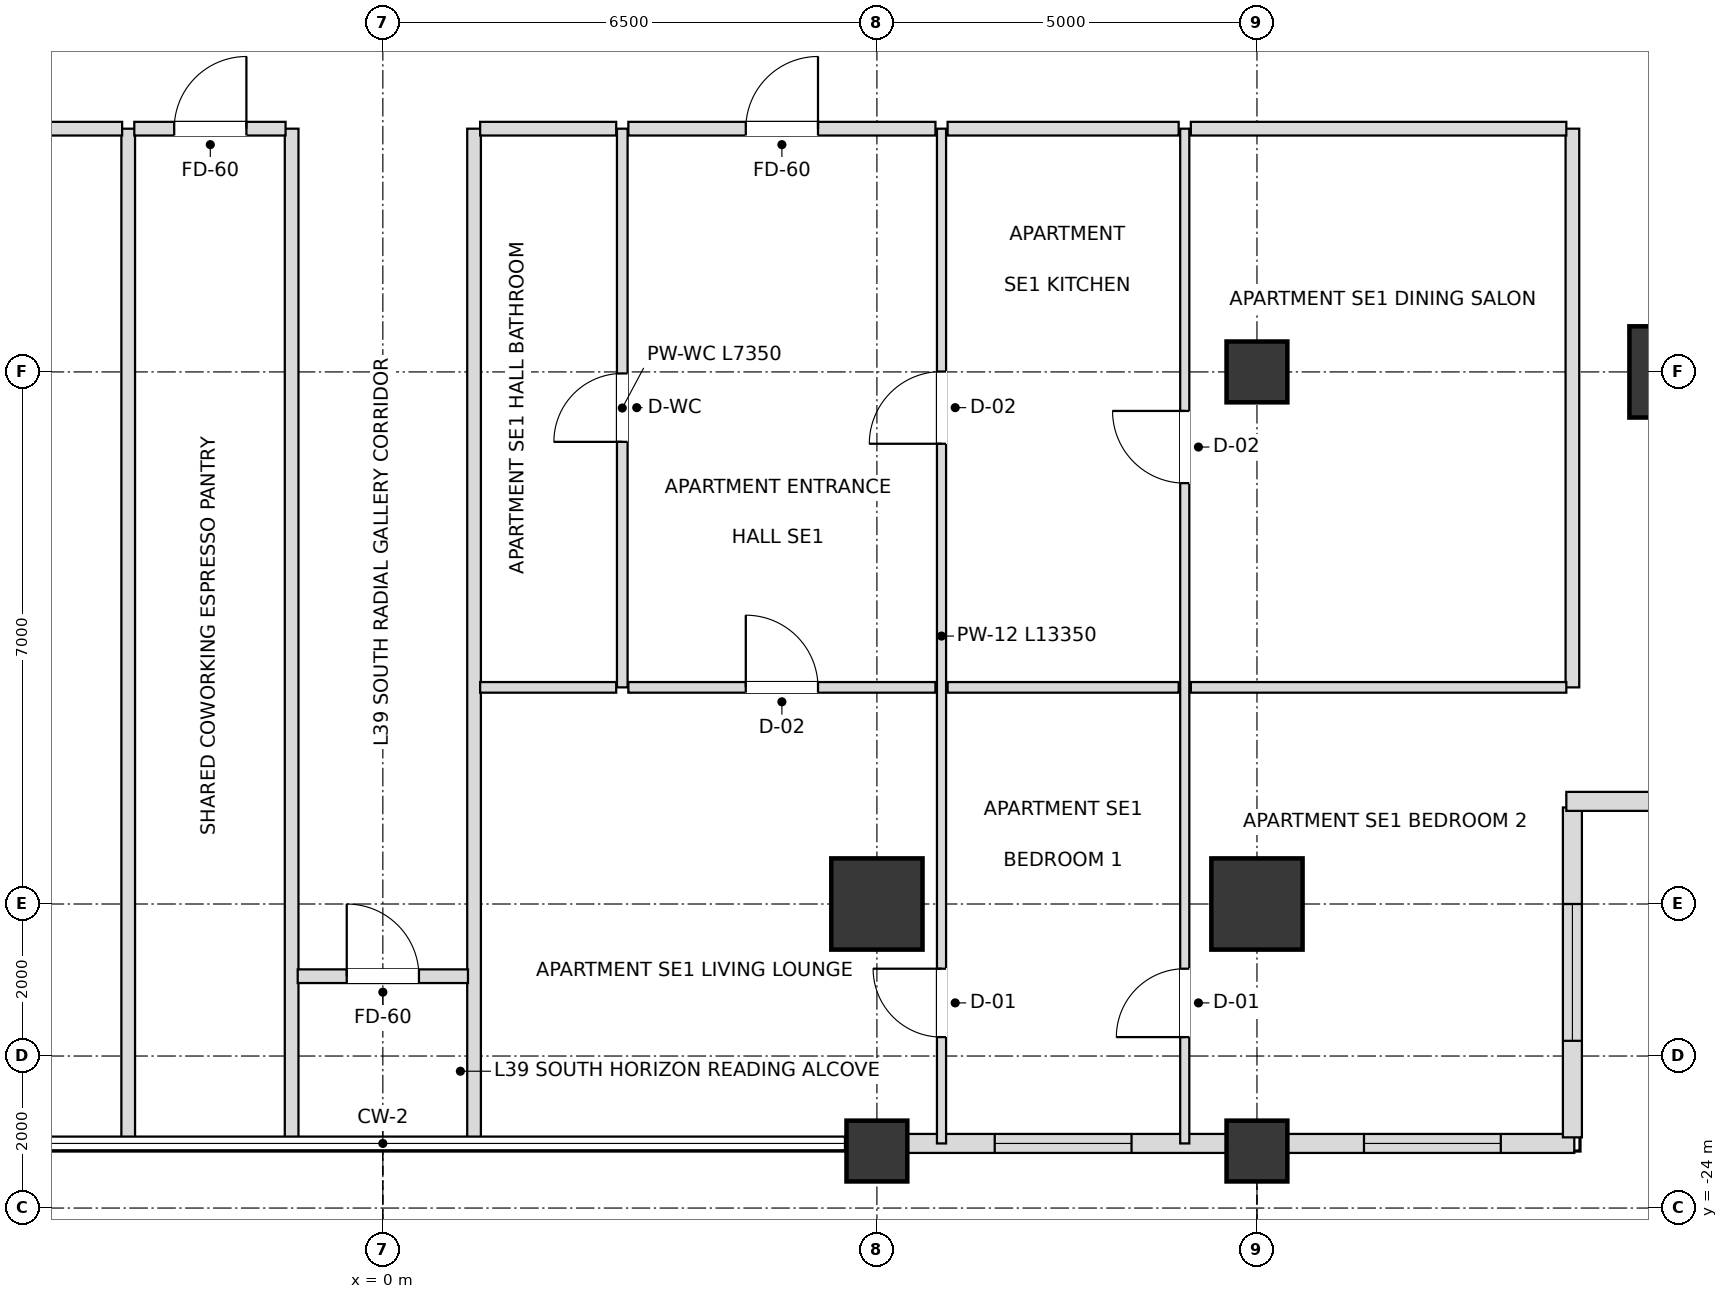
"""IFC4 building model, lengths in metres.
Left out: names, types, materials, properties, quantities, classifications, styles, units other than length and angle.
Written with IfcOpenShell. Run it as: python <this file> out.ifc"""

import sys

from ifc_helpers import new_model, si_unit, direction, frame, frame_2d, origin, origin_2d, place, context, subcontext, project, spatial, rectangle, extrude, element, fill, save


model = new_model("IFC4")
c1 = context("Model", 3, precision=1e-05, world=origin(), true_north=direction((0.0, 1.0)))
c2 = subcontext(c1, "Body", "Model", "MODEL_VIEW")
j1 = project(units=[si_unit("LENGTHUNIT", "METRE"), si_unit("PLANEANGLEUNIT", "RADIAN")], contexts=[c1])
p1 = place(None, origin())
s1 = spatial("IfcSite", under=j1, at=p1, CompositionType="ELEMENT")
p2 = place(p1, origin())
s2 = spatial("IfcBuilding", under=s1, at=p2, CompositionType="ELEMENT")
p3 = place(p2, frame((0.0, 0.0, 154.8)))
s3 = spatial("IfcBuildingStorey", under=s2, at=p3, CompositionType="ELEMENT", Elevation=154.8)
for number, where, z_axis, x_axis in (
    (1, (6.5, -20.0, 0.0), (0.0, 0.0, 1.0), (1.0, 0.0, 0.0)),
    (2, (11.5, -20.0, 0.0), (0.0, 0.0, 1.0), (1.0, 0.0, 0.0)),
    (3, (17.0, -13.0, 0.0), (0.0, 0.0, 1.0), (1.0, 0.0, 0.0)),
):
    element("IfcColumn", number, at=place(p3, frame(where, z_axis=z_axis, x_axis=x_axis)), inside=s3, PredefinedType="USERDEFINED", context=c2, shape_type="SweptSolid", body=[
        extrude(rectangle(XDim=1.2, YDim=1.2, at=origin_2d()), origin(), (0.0, 0.0, 1.0), 3.6),
    ])
for number, where, z_axis, x_axis in (
    (4, (11.5, -13.0, 0.0), (0.0, 0.0, 1.0), (1.0, 0.0, 0.0)),
    (5, (6.5, -23.25, 0.0), (0.0, 0.0, 1.0), (1.0, 0.0, 0.0)),
    (6, (11.5, -23.25, 0.0), (0.0, 0.0, 1.0), (1.0, 0.0, 0.0)),
):
    element("IfcColumn", number, at=place(p3, frame(where, z_axis=z_axis, x_axis=x_axis)), inside=s3, PredefinedType="COLUMN", context=c2, shape_type="SweptSolid", body=[
        extrude(rectangle(XDim=0.8, YDim=0.8, at=origin_2d()), origin(), (0.0, 0.0, 1.0), 3.6),
    ])
p4 = place(p3, frame((6.895, -23.15, 0.0), z_axis=(0.0, 0.0, 1.0), x_axis=(1.0, 0.0, 0.0)))
e7 = element("IfcWall", 7, at=p4, inside=s3, PredefinedType="SOLIDWALL", context=c2, shape_type="SweptSolid", body=[
    extrude(rectangle(XDim=4.21, YDim=0.25, at=frame_2d((2.105, 0.0))), origin(), (0.0, 0.0, 1.0), 2.736),
])
p5 = place(p4, frame((1.155, 0.0, 0.72)))
e8 = element("IfcOpeningElement", 8, at=p5, cuts=e7, PredefinedType="OPENING", context=c2, shape_type="SweptSolid", body=[
    extrude(rectangle(XDim=1.8, YDim=1.68, at=frame_2d((0.9, 0.84))), frame((0.0, 0.135, 0.0), z_axis=(0.0, -1.0, 0.0), x_axis=(1.0, 0.0, 0.0)), (0.0, 0.0, 1.0), 0.27),
])
p6 = place(p3, frame((11.895, -23.15, 0.0), z_axis=(0.0, 0.0, 1.0), x_axis=(1.0, 0.0, 0.0)))
e9 = element("IfcWall", 9, at=p6, inside=s3, PredefinedType="SOLIDWALL", context=c2, shape_type="SweptSolid", body=[
    extrude(rectangle(XDim=3.78, YDim=0.25, at=frame_2d((1.89, 0.0))), origin(), (0.0, 0.0, 1.0), 2.736),
])
p7 = place(p6, frame((1.013, 0.0, 0.72)))
e10 = element("IfcOpeningElement", 10, at=p7, cuts=e9, PredefinedType="OPENING", context=c2, shape_type="SweptSolid", body=[
    extrude(rectangle(XDim=1.8, YDim=1.68, at=frame_2d((0.9, 0.84))), frame((0.0, 0.135, 0.0), z_axis=(0.0, -1.0, 0.0), x_axis=(1.0, 0.0, 0.0)), (0.0, 0.0, 1.0), 0.27),
])
p8 = place(p3, frame((15.65, -23.07, 0.0), z_axis=(0.0, 0.0, 1.0), x_axis=(0.0, 1.0, 0.0)))
e11 = element("IfcWall", 11, at=p8, inside=s3, PredefinedType="SOLIDWALL", context=c2, shape_type="SweptSolid", body=[
    extrude(rectangle(XDim=4.34, YDim=0.25, at=frame_2d((2.17, 0.0))), origin(), (0.0, 0.0, 1.0), 2.736),
])
p9 = place(p8, frame((1.27, 0.0, 0.72)))
e12 = element("IfcOpeningElement", 12, at=p9, cuts=e11, PredefinedType="OPENING", context=c2, shape_type="SweptSolid", body=[
    extrude(rectangle(XDim=1.8, YDim=1.68, at=frame_2d((0.9, 0.84))), frame((0.0, 0.135, 0.0), z_axis=(0.0, -1.0, 0.0), x_axis=(1.0, 0.0, 0.0)), (0.0, 0.0, 1.0), 0.27),
])
p10 = place(p3, frame((15.57, -18.65, 0.0), z_axis=(0.0, 0.0, 1.0), x_axis=(1.0, 0.0, 0.0)))
e13 = element("IfcWall", 13, at=p10, inside=s3, PredefinedType="SOLIDWALL", context=c2, shape_type="SweptSolid", body=[
    extrude(rectangle(XDim=4.66, YDim=0.25, at=frame_2d((2.33, 0.0))), origin(), (0.0, 0.0, 1.0), 2.736),
])
p11 = place(p10, frame((1.43, 0.0, 0.72)))
e14 = element("IfcOpeningElement", 14, at=p11, cuts=e13, PredefinedType="OPENING", context=c2, shape_type="SweptSolid", body=[
    extrude(rectangle(XDim=1.8, YDim=1.68, at=frame_2d((0.9, 0.84))), frame((0.0, 0.135, 0.0), z_axis=(0.0, -1.0, 0.0), x_axis=(1.0, 0.0, 0.0)), (0.0, 0.0, 1.0), 0.27),
])
for number, where, z_axis, x_axis in (
    (15, (-3.35, -23.15, 0.0), (0.0, 0.0, 1.0), (0.0, 1.0, 0.0)),
    (16, (-1.2, -23.15, 0.0), (0.0, 0.0, 1.0), (0.0, 1.0, 0.0)),
    (17, (1.2, -23.15, 0.0), (0.0, 0.0, 1.0), (0.0, 1.0, 0.0)),
):
    element("IfcWall", number, at=place(p3, frame(where, z_axis=z_axis, x_axis=x_axis)), inside=s3, PredefinedType="PARTITIONING", context=c2, shape_type="SweptSolid", body=[
        extrude(rectangle(XDim=13.35, YDim=0.18, at=frame_2d((6.675, 0.0))), origin(), (0.0, 0.0, 1.0), 2.816),
    ])
p12 = place(p3, frame((3.15, -17.15, 0.0), z_axis=(0.0, 0.0, 1.0), x_axis=(0.0, 1.0, 0.0)))
e18 = element("IfcWall", 18, at=p12, inside=s3, PredefinedType="PARTITIONING", context=c2, shape_type="SweptSolid", body=[
    extrude(rectangle(XDim=7.35, YDim=0.14, at=frame_2d((3.675, 0.0))), origin(), (0.0, 0.0, 1.0), 3.38),
])
p13 = place(p12, frame((3.23, 0.0, 0.0)))
e19 = element("IfcOpeningElement", 19, at=p13, cuts=e18, PredefinedType="OPENING", context=c2, shape_type="SweptSolid", body=[
    extrude(rectangle(XDim=0.9, YDim=2.1, at=frame_2d((0.45, 1.05))), frame((0.0, 0.08, 0.0), z_axis=(0.0, -1.0, 0.0), x_axis=(1.0, 0.0, 0.0)), (0.0, 0.0, 1.0), 0.16),
])
p14 = place(p3, frame((7.35, -23.15, 0.0), z_axis=(0.0, 0.0, 1.0), x_axis=(0.0, 1.0, 0.0)))
e20 = element("IfcWall", 20, at=p14, inside=s3, PredefinedType="PARTITIONING", context=c2, shape_type="SweptSolid", body=[
    extrude(rectangle(XDim=13.35, YDim=0.12, at=frame_2d((6.675, 0.0))), origin(), (0.0, 0.0, 1.0), 2.816),
])
p15 = place(p14, frame((9.205, 0.0, 0.0)))
e21 = element("IfcOpeningElement", 21, at=p15, cuts=e20, PredefinedType="OPENING", context=c2, shape_type="SweptSolid", body=[
    extrude(rectangle(XDim=0.95, YDim=2.1, at=frame_2d((0.475, 1.05))), frame((0.0, 0.07, 0.0), z_axis=(0.0, -1.0, 0.0), x_axis=(1.0, 0.0, 0.0)), (0.0, 0.0, 1.0), 0.14),
])
p16 = place(p14, frame((1.399, 0.0, 0.0)))
e22 = element("IfcOpeningElement", 22, at=p16, cuts=e20, PredefinedType="OPENING", context=c2, shape_type="SweptSolid", body=[
    extrude(rectangle(XDim=0.9, YDim=2.1, at=frame_2d((0.45, 1.05))), frame((0.0, 0.07, 0.0), z_axis=(0.0, -1.0, 0.0), x_axis=(1.0, 0.0, 0.0)), (0.0, 0.0, 1.0), 0.14),
])
p17 = place(p3, frame((10.55, -23.15, 0.0), z_axis=(0.0, 0.0, 1.0), x_axis=(0.0, 1.0, 0.0)))
e23 = element("IfcWall", 23, at=p17, inside=s3, PredefinedType="PARTITIONING", context=c2, shape_type="SweptSolid", body=[
    extrude(rectangle(XDim=13.35, YDim=0.12, at=frame_2d((6.675, 0.0))), origin(), (0.0, 0.0, 1.0), 2.816),
])
p18 = place(p17, frame((8.687, 0.0, 0.0)))
e24 = element("IfcOpeningElement", 24, at=p18, cuts=e23, PredefinedType="OPENING", context=c2, shape_type="SweptSolid", body=[
    extrude(rectangle(XDim=0.95, YDim=2.1, at=frame_2d((0.475, 1.05))), frame((0.0, 0.07, 0.0), z_axis=(0.0, -1.0, 0.0), x_axis=(1.0, 0.0, 0.0)), (0.0, 0.0, 1.0), 0.14),
])
p19 = place(p17, frame((1.399, 0.0, 0.0)))
e25 = element("IfcOpeningElement", 25, at=p19, cuts=e23, PredefinedType="OPENING", context=c2, shape_type="SweptSolid", body=[
    extrude(rectangle(XDim=0.9, YDim=2.1, at=frame_2d((0.45, 1.05))), frame((0.0, 0.07, 0.0), z_axis=(0.0, -1.0, 0.0), x_axis=(1.0, 0.0, 0.0)), (0.0, 0.0, 1.0), 0.14),
])
p20 = place(p3, frame((15.65, -17.15, 0.0), z_axis=(0.0, 0.0, 1.0), x_axis=(0.0, 1.0, 0.0)))
e26 = element("IfcWall", 26, at=p20, inside=s3, PredefinedType="PARTITIONING", context=c2, shape_type="SweptSolid", body=[
    extrude(rectangle(XDim=7.35, YDim=0.18, at=frame_2d((3.675, 0.0))), origin(), (0.0, 0.0, 1.0), 2.736),
])
p21 = place(p3, frame((-1.12, -20.95, 0.0), z_axis=(0.0, 0.0, 1.0), x_axis=(1.0, 0.0, 0.0)))
e27 = element("IfcWall", 27, at=p21, inside=s3, PredefinedType="PARTITIONING", context=c2, shape_type="SweptSolid", body=[
    extrude(rectangle(XDim=2.24, YDim=0.18, at=frame_2d((1.12, 0.0))), origin(), (0.0, 0.0, 1.0), 3.38),
])
p22 = place(p21, frame((0.645, 0.0, 0.0)))
e28 = element("IfcOpeningElement", 28, at=p22, cuts=e27, PredefinedType="OPENING", context=c2, shape_type="SweptSolid", body=[
    extrude(rectangle(XDim=0.95, YDim=2.15, at=frame_2d((0.475, 1.075))), frame((0.0, 0.1, 0.0), z_axis=(0.0, -1.0, 0.0), x_axis=(1.0, 0.0, 0.0)), (0.0, 0.0, 1.0), 0.2),
])
p23 = place(p3, frame((1.28, -17.15, 0.0), z_axis=(0.0, 0.0, 1.0), x_axis=(1.0, 0.0, 0.0)))
e29 = element("IfcWall", 29, at=p23, inside=s3, PredefinedType="PARTITIONING", context=c2, shape_type="SweptSolid", body=[
    extrude(rectangle(XDim=1.79, YDim=0.14, at=frame_2d((0.895, 0.0))), origin(), (0.0, 0.0, 1.0), 3.38),
])
p24 = place(p3, frame((3.23, -17.15, 0.0), z_axis=(0.0, 0.0, 1.0), x_axis=(1.0, 0.0, 0.0)))
e30 = element("IfcWall", 30, at=p24, inside=s3, PredefinedType="PARTITIONING", context=c2, shape_type="SweptSolid", body=[
    extrude(rectangle(XDim=4.04, YDim=0.14, at=frame_2d((2.02, 0.0))), origin(), (0.0, 0.0, 1.0), 2.816),
])
p25 = place(p24, frame((1.545, 0.0, 0.0)))
e31 = element("IfcOpeningElement", 31, at=p25, cuts=e30, PredefinedType="OPENING", context=c2, shape_type="SweptSolid", body=[
    extrude(rectangle(XDim=0.95, YDim=2.1, at=frame_2d((0.475, 1.05))), frame((0.0, 0.08, 0.0), z_axis=(0.0, -1.0, 0.0), x_axis=(1.0, 0.0, 0.0)), (0.0, 0.0, 1.0), 0.16),
])
p26 = place(p3, frame((7.43, -17.15, 0.0), z_axis=(0.0, 0.0, 1.0), x_axis=(1.0, 0.0, 0.0)))
e32 = element("IfcWall", 32, at=p26, inside=s3, PredefinedType="PARTITIONING", context=c2, shape_type="SweptSolid", body=[
    extrude(rectangle(XDim=3.04, YDim=0.14, at=frame_2d((1.52, 0.0))), origin(), (0.0, 0.0, 1.0), 3.38),
])
p27 = place(p3, frame((10.63, -17.15, 0.0), z_axis=(0.0, 0.0, 1.0), x_axis=(1.0, 0.0, 0.0)))
e33 = element("IfcWall", 33, at=p27, inside=s3, PredefinedType="PARTITIONING", context=c2, shape_type="SweptSolid", body=[
    extrude(rectangle(XDim=4.94, YDim=0.14, at=frame_2d((2.47, 0.0))), origin(), (0.0, 0.0, 1.0), 2.736),
])
p28 = place(p3, frame((-10.67, -9.8, 0.0), z_axis=(0.0, 0.0, 1.0), x_axis=(1.0, 0.0, 0.0)))
e34 = element("IfcWall", 34, at=p28, inside=s3, PredefinedType="PARTITIONING", context=c2, shape_type="SweptSolid", body=[
    extrude(rectangle(XDim=7.24, YDim=0.18, at=frame_2d((3.62, 0.0))), origin(), (0.0, 0.0, 1.0), 2.816),
])
p29 = place(p28, frame((3.155, 0.0, 0.0)))
e35 = element("IfcOpeningElement", 35, at=p29, cuts=e34, PredefinedType="OPENING", context=c2, shape_type="SweptSolid", body=[
    extrude(rectangle(XDim=0.95, YDim=2.15, at=frame_2d((0.475, 1.075))), frame((0.0, 0.1, 0.0), z_axis=(0.0, -1.0, 0.0), x_axis=(1.0, 0.0, 0.0)), (0.0, 0.0, 1.0), 0.2),
])
p30 = place(p3, frame((-3.27, -9.8, 0.0), z_axis=(0.0, 0.0, 1.0), x_axis=(1.0, 0.0, 0.0)))
e36 = element("IfcWall", 36, at=p30, inside=s3, PredefinedType="PARTITIONING", context=c2, shape_type="SweptSolid", body=[
    extrude(rectangle(XDim=1.99, YDim=0.18, at=frame_2d((0.995, 0.0))), origin(), (0.0, 0.0, 1.0), 3.38),
])
p31 = place(p30, frame((0.525, 0.0, 0.0)))
e37 = element("IfcOpeningElement", 37, at=p31, cuts=e36, PredefinedType="OPENING", context=c2, shape_type="SweptSolid", body=[
    extrude(rectangle(XDim=0.95, YDim=2.15, at=frame_2d((0.475, 1.075))), frame((0.0, 0.1, 0.0), z_axis=(0.0, -1.0, 0.0), x_axis=(1.0, 0.0, 0.0)), (0.0, 0.0, 1.0), 0.2),
])
p32 = place(p3, frame((1.28, -9.8, 0.0), z_axis=(0.0, 0.0, 1.0), x_axis=(1.0, 0.0, 0.0)))
e38 = element("IfcWall", 38, at=p32, inside=s3, PredefinedType="PARTITIONING", context=c2, shape_type="SweptSolid", body=[
    extrude(rectangle(XDim=1.79, YDim=0.18, at=frame_2d((0.895, 0.0))), origin(), (0.0, 0.0, 1.0), 3.38),
])
p33 = place(p3, frame((3.23, -9.8, 0.0), z_axis=(0.0, 0.0, 1.0), x_axis=(1.0, 0.0, 0.0)))
e39 = element("IfcWall", 39, at=p33, inside=s3, PredefinedType="PARTITIONING", context=c2, shape_type="SweptSolid", body=[
    extrude(rectangle(XDim=4.04, YDim=0.18, at=frame_2d((2.02, 0.0))), origin(), (0.0, 0.0, 1.0), 2.816),
])
p34 = place(p33, frame((1.545, 0.0, 0.0)))
e40 = element("IfcOpeningElement", 40, at=p34, cuts=e39, PredefinedType="OPENING", context=c2, shape_type="SweptSolid", body=[
    extrude(rectangle(XDim=0.95, YDim=2.15, at=frame_2d((0.475, 1.075))), frame((0.0, 0.1, 0.0), z_axis=(0.0, -1.0, 0.0), x_axis=(1.0, 0.0, 0.0)), (0.0, 0.0, 1.0), 0.2),
])
p35 = place(p3, frame((7.43, -9.8, 0.0), z_axis=(0.0, 0.0, 1.0), x_axis=(1.0, 0.0, 0.0)))
e41 = element("IfcWall", 41, at=p35, inside=s3, PredefinedType="PARTITIONING", context=c2, shape_type="SweptSolid", body=[
    extrude(rectangle(XDim=3.04, YDim=0.18, at=frame_2d((1.52, 0.0))), origin(), (0.0, 0.0, 1.0), 3.38),
])
p36 = place(p3, frame((10.63, -9.8, 0.0), z_axis=(0.0, 0.0, 1.0), x_axis=(1.0, 0.0, 0.0)))
e42 = element("IfcWall", 42, at=p36, inside=s3, PredefinedType="PARTITIONING", context=c2, shape_type="SweptSolid", body=[
    extrude(rectangle(XDim=4.94, YDim=0.18, at=frame_2d((2.47, 0.0))), origin(), (0.0, 0.0, 1.0), 3.38),
])
p37 = place(p5, origin())
e43 = element("IfcWindow", 43, at=p37, inside=s3, PartitioningType="SINGLE_PANEL", PredefinedType="WINDOW", context=c2, shape_type="SweptSolid", body=[
    extrude(rectangle(XDim=1.8, YDim=1.68, at=frame_2d((0.9, 0.84))), frame((0.0, 0.03, 0.0), z_axis=(0.0, -1.0, 0.0), x_axis=(1.0, 0.0, 0.0)), (0.0, 0.0, 1.0), 0.06),
])
fill(e8, e43)
p38 = place(p7, origin())
e44 = element("IfcWindow", 44, at=p38, inside=s3, PartitioningType="SINGLE_PANEL", PredefinedType="WINDOW", context=c2, shape_type="SweptSolid", body=[
    extrude(rectangle(XDim=1.8, YDim=1.68, at=frame_2d((0.9, 0.84))), frame((0.0, 0.03, 0.0), z_axis=(0.0, -1.0, 0.0), x_axis=(1.0, 0.0, 0.0)), (0.0, 0.0, 1.0), 0.06),
])
fill(e10, e44)
p39 = place(p9, origin())
e45 = element("IfcWindow", 45, at=p39, inside=s3, PartitioningType="SINGLE_PANEL", PredefinedType="WINDOW", context=c2, shape_type="SweptSolid", body=[
    extrude(rectangle(XDim=1.8, YDim=1.68, at=frame_2d((0.9, 0.84))), frame((0.0, 0.03, 0.0), z_axis=(0.0, -1.0, 0.0), x_axis=(1.0, 0.0, 0.0)), (0.0, 0.0, 1.0), 0.06),
])
fill(e12, e45)
p40 = place(p22, origin())
e46 = element("IfcDoor", 46, at=p40, inside=s3, OperationType="SINGLE_SWING_LEFT", PredefinedType="DOOR", context=c2, shape_type="SweptSolid", body=[
    extrude(rectangle(XDim=0.95, YDim=2.15, at=frame_2d((0.475, 1.075))), frame((0.0, 0.025, 0.0), z_axis=(0.0, -1.0, 0.0), x_axis=(1.0, 0.0, 0.0)), (0.0, 0.0, 1.0), 0.05),
])
fill(e28, e46)
p41 = place(p31, origin())
e47 = element("IfcDoor", 47, at=p41, inside=s3, OperationType="SINGLE_SWING_RIGHT", PredefinedType="DOOR", context=c2, shape_type="SweptSolid", body=[
    extrude(rectangle(XDim=0.95, YDim=2.15, at=frame_2d((0.475, 1.075))), frame((0.0, 0.025, 0.0), z_axis=(0.0, -1.0, 0.0), x_axis=(1.0, 0.0, 0.0)), (0.0, 0.0, 1.0), 0.05),
])
fill(e37, e47)
p42 = place(p13, origin())
e48 = element("IfcDoor", 48, at=p42, inside=s3, OperationType="SINGLE_SWING_LEFT", PredefinedType="DOOR", context=c2, shape_type="SweptSolid", body=[
    extrude(rectangle(XDim=0.9, YDim=2.1, at=frame_2d((0.45, 1.05))), frame((0.0, 0.025, 0.0), z_axis=(0.0, -1.0, 0.0), x_axis=(1.0, 0.0, 0.0)), (0.0, 0.0, 1.0), 0.05),
])
fill(e19, e48)
p43 = place(p34, origin())
e49 = element("IfcDoor", 49, at=p43, inside=s3, OperationType="SINGLE_SWING_RIGHT", PredefinedType="DOOR", context=c2, shape_type="SweptSolid", body=[
    extrude(rectangle(XDim=0.95, YDim=2.15, at=frame_2d((0.475, 1.075))), frame((0.0, 0.025, 0.0), z_axis=(0.0, -1.0, 0.0), x_axis=(1.0, 0.0, 0.0)), (0.0, 0.0, 1.0), 0.05),
])
fill(e40, e49)
p44 = place(p15, origin())
e50 = element("IfcDoor", 50, at=p44, inside=s3, OperationType="SINGLE_SWING_LEFT", PredefinedType="DOOR", context=c2, shape_type="SweptSolid", body=[
    extrude(rectangle(XDim=0.95, YDim=2.1, at=frame_2d((0.475, 1.05))), frame((0.0, 0.025, 0.0), z_axis=(0.0, -1.0, 0.0), x_axis=(1.0, 0.0, 0.0)), (0.0, 0.0, 1.0), 0.05),
])
fill(e21, e50)
p45 = place(p18, origin())
e51 = element("IfcDoor", 51, at=p45, inside=s3, OperationType="SINGLE_SWING_RIGHT", PredefinedType="DOOR", context=c2, shape_type="SweptSolid", body=[
    extrude(rectangle(XDim=0.95, YDim=2.1, at=frame_2d((0.475, 1.05))), frame((0.0, 0.025, 0.0), z_axis=(0.0, -1.0, 0.0), x_axis=(1.0, 0.0, 0.0)), (0.0, 0.0, 1.0), 0.05),
])
fill(e24, e51)
p46 = place(p25, origin())
e52 = element("IfcDoor", 52, at=p46, inside=s3, OperationType="SINGLE_SWING_LEFT", PredefinedType="DOOR", context=c2, shape_type="SweptSolid", body=[
    extrude(rectangle(XDim=0.95, YDim=2.1, at=frame_2d((0.475, 1.05))), frame((0.0, 0.025, 0.0), z_axis=(0.0, -1.0, 0.0), x_axis=(1.0, 0.0, 0.0)), (0.0, 0.0, 1.0), 0.05),
])
fill(e31, e52)
p47 = place(p16, origin())
e53 = element("IfcDoor", 53, at=p47, inside=s3, OperationType="SINGLE_SWING_RIGHT", PredefinedType="DOOR", context=c2, shape_type="SweptSolid", body=[
    extrude(rectangle(XDim=0.9, YDim=2.1, at=frame_2d((0.45, 1.05))), frame((0.0, 0.025, 0.0), z_axis=(0.0, -1.0, 0.0), x_axis=(1.0, 0.0, 0.0)), (0.0, 0.0, 1.0), 0.05),
])
fill(e22, e53)
p48 = place(p19, origin())
e54 = element("IfcDoor", 54, at=p48, inside=s3, OperationType="SINGLE_SWING_LEFT", PredefinedType="DOOR", context=c2, shape_type="SweptSolid", body=[
    extrude(rectangle(XDim=0.9, YDim=2.1, at=frame_2d((0.45, 1.05))), frame((0.0, 0.025, 0.0), z_axis=(0.0, -1.0, 0.0), x_axis=(1.0, 0.0, 0.0)), (0.0, 0.0, 1.0), 0.05),
])
fill(e25, e54)
save(model, sys.argv[1])
